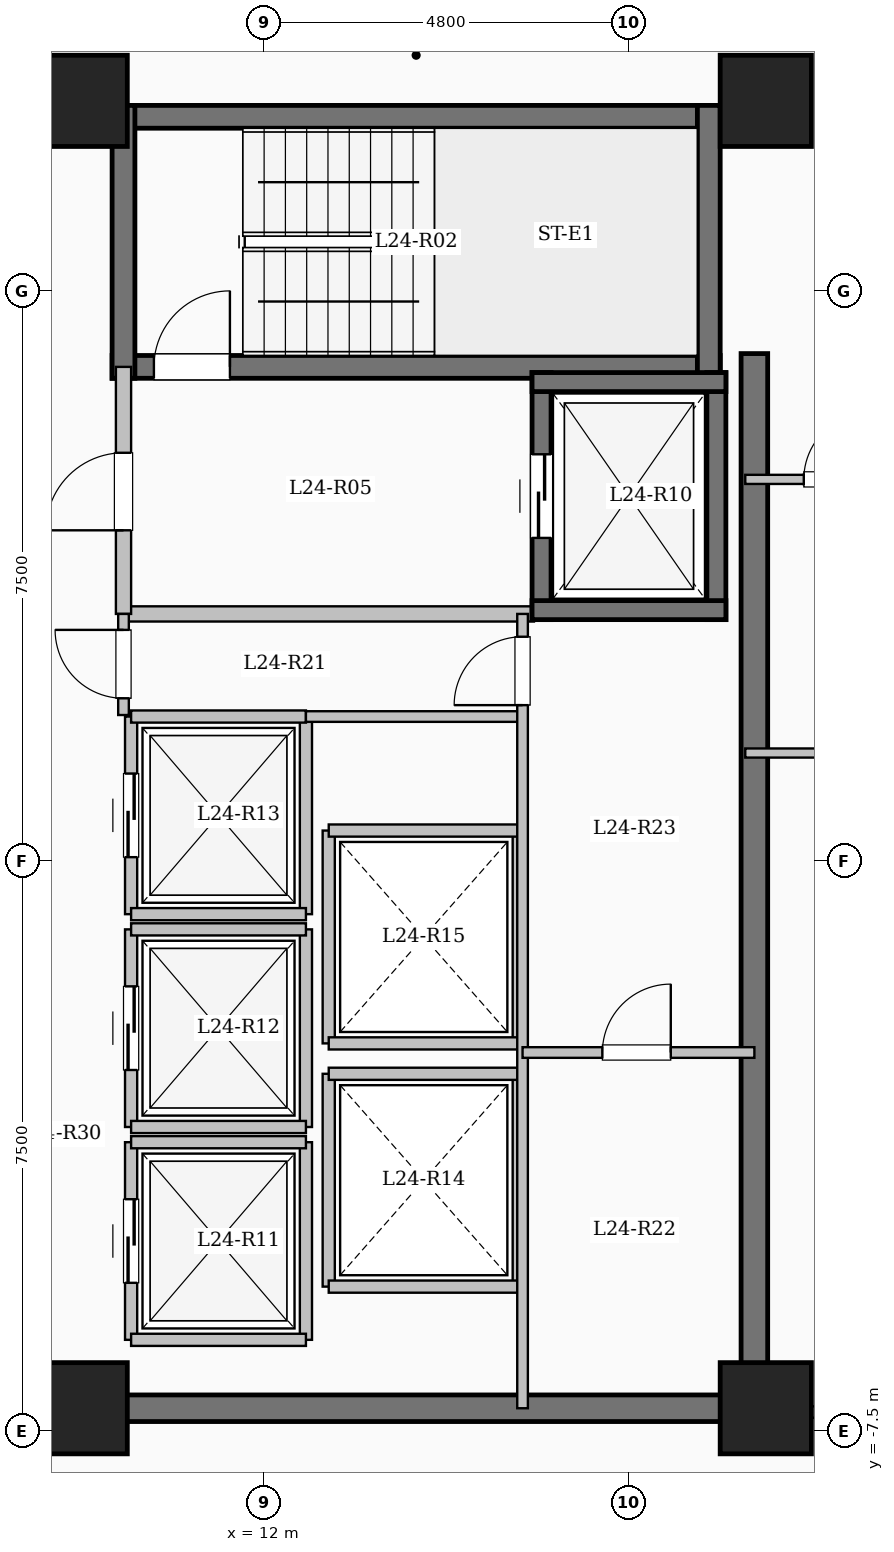
"""IFC4 building model, lengths in metres.
Left out: names, types, materials, properties, quantities, classifications, styles, units other than length and angle.
Written with IfcOpenShell. Run it as: python <this file> out.ifc"""

import sys

from ifc_helpers import new_model, si_unit, direction, frame, frame_2d, origin, origin_2d, place, context, subcontext, project, spatial, rectangle, extrude, element, fill, save


model = new_model("IFC4")
c1 = context("Model", 3, precision=1e-05, world=origin(), true_north=direction((0.0, 1.0)))
c2 = subcontext(c1, "Body", "Model", "MODEL_VIEW")
j1 = project(units=[si_unit("LENGTHUNIT", "METRE"), si_unit("PLANEANGLEUNIT", "RADIAN")], contexts=[c1])
p1 = place(None, origin())
s1 = spatial("IfcSite", under=j1, at=p1, CompositionType="ELEMENT")
p2 = place(p1, origin())
s2 = spatial("IfcBuilding", under=s1, at=p2, CompositionType="ELEMENT")
p3 = place(p2, frame((0.0, 0.0, 91.7)))
s3 = spatial("IfcBuildingStorey", under=s2, at=p3, CompositionType="ELEMENT", Elevation=91.7)
for number, where, z_axis, x_axis in (
    (1, (9.6, -7.2, 0.0), (0.0, 0.0, 1.0), (1.0, 0.0, 0.0)),
    (2, (9.6, 10.0, 0.0), (0.0, 0.0, 1.0), (1.0, 0.0, 0.0)),
    (3, (18.6, -7.2, 0.0), (0.0, 0.0, 1.0), (1.0, 0.0, 0.0)),
    (4, (18.6, 10.0, 0.0), (0.0, 0.0, 1.0), (1.0, 0.0, 0.0)),
):
    element("IfcColumn", number, at=place(p3, frame(where, z_axis=z_axis, x_axis=x_axis)), inside=s3, PredefinedType="COLUMN", context=c2, shape_type="SweptSolid", body=[
        extrude(rectangle(XDim=1.2, YDim=1.2, at=origin_2d()), origin(), (0.0, 0.0, 1.0), 3.35),
    ])
p4 = place(p3, frame((10.0, 9.79, 0.0), z_axis=(0.0, 0.0, 1.0), x_axis=(1.0, 0.0, 0.0)))
e5 = element("IfcWall", 5, at=p4, inside=s3, PredefinedType="SHEAR", context=c2, shape_type="SweptSolid", body=[
    extrude(rectangle(XDim=8.0, YDim=0.3, at=frame_2d((4.0, 0.0))), origin(), (0.0, 0.0, 1.0), 3.35),
])
p5 = place(p3, frame((10.0, 6.5, 0.0), z_axis=(0.0, 0.0, 1.0), x_axis=(1.0, 0.0, 0.0)))
e6 = element("IfcWall", 6, at=p5, inside=s3, PredefinedType="SHEAR", context=c2, shape_type="SweptSolid", body=[
    extrude(rectangle(XDim=8.0, YDim=0.3, at=frame_2d((4.0, 0.0))), origin(), (0.0, 0.0, 1.0), 3.35),
])
p6 = place(p5, frame((0.55, 0.0, 0.0)))
e7 = element("IfcOpeningElement", 7, at=p6, cuts=e6, PredefinedType="OPENING", context=c2, shape_type="SweptSolid", body=[
    extrude(rectangle(XDim=1.0, YDim=2.15, at=frame_2d((0.5, 1.075))), frame((0.0, 0.16, 0.0), z_axis=(0.0, -1.0, 0.0), x_axis=(1.0, 0.0, 0.0)), (0.0, 0.0, 1.0), 0.32),
])
for number, where, z_axis, x_axis in (
    (8, (10.15, 6.35, 0.0), (0.0, 0.0, 1.0), (0.0, 1.0, 0.0)),
    (9, (17.85, 6.35, 0.0), (0.0, 0.0, 1.0), (0.0, 1.0, 0.0)),
):
    element("IfcWall", number, at=place(p3, frame(where, z_axis=z_axis, x_axis=x_axis)), inside=s3, PredefinedType="SHEAR", context=c2, shape_type="SweptSolid", body=[
        extrude(rectangle(XDim=3.59, YDim=0.3, at=frame_2d((1.795, 0.0))), origin(), (0.0, 0.0, 1.0), 3.35),
    ])
p7 = place(p3, frame((10.15, 3.25, 0.0), z_axis=(0.0, 0.0, 1.0), x_axis=(1.0, 0.0, 0.0)))
e10 = element("IfcWall", 10, at=p7, inside=s3, PredefinedType="SOLIDWALL", context=c2, shape_type="SweptSolid", body=[
    extrude(rectangle(XDim=5.4, YDim=0.2, at=frame_2d((2.7, 0.0))), origin(), (0.0, 0.0, 1.0), 3.1),
])
p8 = place(p3, frame((10.15, 3.25, 0.0), z_axis=(0.0, 0.0, 1.0), x_axis=(0.0, 1.0, 0.0)))
e11 = element("IfcWall", 11, at=p8, inside=s3, PredefinedType="SOLIDWALL", context=c2, shape_type="SweptSolid", body=[
    extrude(rectangle(XDim=3.25, YDim=0.2, at=frame_2d((1.625, 0.0))), origin(), (0.0, 0.0, 1.0), 3.1),
])
p9 = place(p8, frame((1.1, 0.0, 0.0)))
e12 = element("IfcOpeningElement", 12, at=p9, cuts=e11, PredefinedType="OPENING", context=c2, shape_type="SweptSolid", body=[
    extrude(rectangle(XDim=1.02, YDim=2.15, at=frame_2d((0.51, 1.075))), frame((0.0, 0.11, 0.0), z_axis=(0.0, -1.0, 0.0), x_axis=(1.0, 0.0, 0.0)), (0.0, 0.0, 1.0), 0.22),
])
p10 = place(p3, frame((15.65, 3.175, 0.0), z_axis=(0.0, 0.0, 1.0), x_axis=(0.0, 1.0, 0.0)))
e13 = element("IfcWall", 13, at=p10, inside=s3, PredefinedType="SHEAR", context=c2, shape_type="SweptSolid", body=[
    extrude(rectangle(XDim=3.25, YDim=0.25, at=frame_2d((1.625, 0.0))), origin(), (0.0, 0.0, 1.0), 3.35),
])
p11 = place(p10, frame((1.075, 0.0, 0.0)))
e14 = element("IfcOpeningElement", 14, at=p11, cuts=e13, PredefinedType="OPENING", context=c2, shape_type="SweptSolid", body=[
    extrude(rectangle(XDim=1.1, YDim=2.15, at=frame_2d((0.55, 1.075))), frame((0.0, 0.135, 0.0), z_axis=(0.0, -1.0, 0.0), x_axis=(1.0, 0.0, 0.0)), (0.0, 0.0, 1.0), 0.27),
])
p12 = place(p3, frame((17.95, 3.175, 0.0), z_axis=(0.0, 0.0, 1.0), x_axis=(0.0, 1.0, 0.0)))
e15 = element("IfcWall", 15, at=p12, inside=s3, PredefinedType="SHEAR", context=c2, shape_type="SweptSolid", body=[
    extrude(rectangle(XDim=3.25, YDim=0.25, at=frame_2d((1.625, 0.0))), origin(), (0.0, 0.0, 1.0), 3.35),
])
for number, where, z_axis, x_axis in (
    (16, (15.525, 3.3, 0.0), (0.0, 0.0, 1.0), (1.0, 0.0, 0.0)),
    (17, (15.525, 6.3, 0.0), (0.0, 0.0, 1.0), (1.0, 0.0, 0.0)),
):
    element("IfcWall", number, at=place(p3, frame(where, z_axis=z_axis, x_axis=x_axis)), inside=s3, PredefinedType="SHEAR", context=c2, shape_type="SweptSolid", body=[
        extrude(rectangle(XDim=2.55, YDim=0.25, at=frame_2d((1.275, 0.0))), origin(), (0.0, 0.0, 1.0), 3.35),
    ])
p13 = place(p3, frame((10.25, -6.3, 0.0), z_axis=(0.0, 0.0, 1.0), x_axis=(0.0, 1.0, 0.0)))
e18 = element("IfcWall", 18, at=p13, inside=s3, PredefinedType="SOLIDWALL", context=c2, shape_type="SweptSolid", body=[
    extrude(rectangle(XDim=2.6, YDim=0.16, at=frame_2d((1.3, 0.0))), origin(), (0.0, 0.0, 1.0), 3.1),
])
p14 = place(p13, frame((0.75, 0.0, 0.0)))
e19 = element("IfcOpeningElement", 19, at=p14, cuts=e18, PredefinedType="OPENING", context=c2, shape_type="SweptSolid", body=[
    extrude(rectangle(XDim=1.1, YDim=2.15, at=frame_2d((0.55, 1.075))), frame((0.0, 0.09, 0.0), z_axis=(0.0, -1.0, 0.0), x_axis=(1.0, 0.0, 0.0)), (0.0, 0.0, 1.0), 0.18),
])
p15 = place(p3, frame((12.55, -6.3, 0.0), z_axis=(0.0, 0.0, 1.0), x_axis=(0.0, 1.0, 0.0)))
e20 = element("IfcWall", 20, at=p15, inside=s3, PredefinedType="SOLIDWALL", context=c2, shape_type="SweptSolid", body=[
    extrude(rectangle(XDim=2.6, YDim=0.16, at=frame_2d((1.3, 0.0))), origin(), (0.0, 0.0, 1.0), 3.1),
])
for number, where, z_axis, x_axis in (
    (21, (10.25, -6.3, 0.0), (0.0, 0.0, 1.0), (1.0, 0.0, 0.0)),
    (22, (10.25, -3.7, 0.0), (0.0, 0.0, 1.0), (1.0, 0.0, 0.0)),
):
    element("IfcWall", number, at=place(p3, frame(where, z_axis=z_axis, x_axis=x_axis)), inside=s3, PredefinedType="SOLIDWALL", context=c2, shape_type="SweptSolid", body=[
        extrude(rectangle(XDim=2.3, YDim=0.16, at=frame_2d((1.15, 0.0))), origin(), (0.0, 0.0, 1.0), 3.1),
    ])
p16 = place(p3, frame((10.25, -3.5, 0.0), z_axis=(0.0, 0.0, 1.0), x_axis=(0.0, 1.0, 0.0)))
e23 = element("IfcWall", 23, at=p16, inside=s3, PredefinedType="SOLIDWALL", context=c2, shape_type="SweptSolid", body=[
    extrude(rectangle(XDim=2.6, YDim=0.16, at=frame_2d((1.3, 0.0))), origin(), (0.0, 0.0, 1.0), 3.1),
])
p17 = place(p16, frame((0.75, 0.0, 0.0)))
e24 = element("IfcOpeningElement", 24, at=p17, cuts=e23, PredefinedType="OPENING", context=c2, shape_type="SweptSolid", body=[
    extrude(rectangle(XDim=1.1, YDim=2.15, at=frame_2d((0.55, 1.075))), frame((0.0, 0.09, 0.0), z_axis=(0.0, -1.0, 0.0), x_axis=(1.0, 0.0, 0.0)), (0.0, 0.0, 1.0), 0.18),
])
p18 = place(p3, frame((12.55, -3.5, 0.0), z_axis=(0.0, 0.0, 1.0), x_axis=(0.0, 1.0, 0.0)))
e25 = element("IfcWall", 25, at=p18, inside=s3, PredefinedType="SOLIDWALL", context=c2, shape_type="SweptSolid", body=[
    extrude(rectangle(XDim=2.6, YDim=0.16, at=frame_2d((1.3, 0.0))), origin(), (0.0, 0.0, 1.0), 3.1),
])
for number, where, z_axis, x_axis in (
    (26, (10.25, -3.5, 0.0), (0.0, 0.0, 1.0), (1.0, 0.0, 0.0)),
    (27, (10.25, -0.9, 0.0), (0.0, 0.0, 1.0), (1.0, 0.0, 0.0)),
):
    element("IfcWall", number, at=place(p3, frame(where, z_axis=z_axis, x_axis=x_axis)), inside=s3, PredefinedType="SOLIDWALL", context=c2, shape_type="SweptSolid", body=[
        extrude(rectangle(XDim=2.3, YDim=0.16, at=frame_2d((1.15, 0.0))), origin(), (0.0, 0.0, 1.0), 3.1),
    ])
p19 = place(p3, frame((10.25, -0.7, 0.0), z_axis=(0.0, 0.0, 1.0), x_axis=(0.0, 1.0, 0.0)))
e28 = element("IfcWall", 28, at=p19, inside=s3, PredefinedType="SOLIDWALL", context=c2, shape_type="SweptSolid", body=[
    extrude(rectangle(XDim=2.6, YDim=0.16, at=frame_2d((1.3, 0.0))), origin(), (0.0, 0.0, 1.0), 3.1),
])
p20 = place(p19, frame((0.75, 0.0, 0.0)))
e29 = element("IfcOpeningElement", 29, at=p20, cuts=e28, PredefinedType="OPENING", context=c2, shape_type="SweptSolid", body=[
    extrude(rectangle(XDim=1.1, YDim=2.15, at=frame_2d((0.55, 1.075))), frame((0.0, 0.09, 0.0), z_axis=(0.0, -1.0, 0.0), x_axis=(1.0, 0.0, 0.0)), (0.0, 0.0, 1.0), 0.18),
])
p21 = place(p3, frame((12.55, -0.7, 0.0), z_axis=(0.0, 0.0, 1.0), x_axis=(0.0, 1.0, 0.0)))
e30 = element("IfcWall", 30, at=p21, inside=s3, PredefinedType="SOLIDWALL", context=c2, shape_type="SweptSolid", body=[
    extrude(rectangle(XDim=2.6, YDim=0.16, at=frame_2d((1.3, 0.0))), origin(), (0.0, 0.0, 1.0), 3.1),
])
for number, where, z_axis, x_axis in (
    (31, (10.25, -0.7, 0.0), (0.0, 0.0, 1.0), (1.0, 0.0, 0.0)),
    (32, (10.25, 1.9, 0.0), (0.0, 0.0, 1.0), (1.0, 0.0, 0.0)),
):
    element("IfcWall", number, at=place(p3, frame(where, z_axis=z_axis, x_axis=x_axis)), inside=s3, PredefinedType="SOLIDWALL", context=c2, shape_type="SweptSolid", body=[
        extrude(rectangle(XDim=2.3, YDim=0.16, at=frame_2d((1.15, 0.0))), origin(), (0.0, 0.0, 1.0), 3.1),
    ])
for number, where, z_axis, x_axis in (
    (33, (12.85, -5.6, 0.0), (0.0, 0.0, 1.0), (0.0, 1.0, 0.0)),
    (34, (15.35, -5.6, 0.0), (0.0, 0.0, 1.0), (0.0, 1.0, 0.0)),
):
    element("IfcWall", number, at=place(p3, frame(where, z_axis=z_axis, x_axis=x_axis)), inside=s3, PredefinedType="SOLIDWALL", context=c2, shape_type="SweptSolid", body=[
        extrude(rectangle(XDim=2.8, YDim=0.16, at=frame_2d((1.4, 0.0))), origin(), (0.0, 0.0, 1.0), 3.1),
    ])
for number, where, z_axis, x_axis in (
    (35, (12.85, -5.6, 0.0), (0.0, 0.0, 1.0), (1.0, 0.0, 0.0)),
    (36, (12.85, -2.8, 0.0), (0.0, 0.0, 1.0), (1.0, 0.0, 0.0)),
):
    element("IfcWall", number, at=place(p3, frame(where, z_axis=z_axis, x_axis=x_axis)), inside=s3, PredefinedType="SOLIDWALL", context=c2, shape_type="SweptSolid", body=[
        extrude(rectangle(XDim=2.5, YDim=0.16, at=frame_2d((1.25, 0.0))), origin(), (0.0, 0.0, 1.0), 3.1),
    ])
for number, where, z_axis, x_axis in (
    (37, (12.85, -2.4, 0.0), (0.0, 0.0, 1.0), (0.0, 1.0, 0.0)),
    (38, (15.35, -2.4, 0.0), (0.0, 0.0, 1.0), (0.0, 1.0, 0.0)),
):
    element("IfcWall", number, at=place(p3, frame(where, z_axis=z_axis, x_axis=x_axis)), inside=s3, PredefinedType="SOLIDWALL", context=c2, shape_type="SweptSolid", body=[
        extrude(rectangle(XDim=2.8, YDim=0.16, at=frame_2d((1.4, 0.0))), origin(), (0.0, 0.0, 1.0), 3.1),
    ])
for number, where, z_axis, x_axis in (
    (39, (12.85, -2.4, 0.0), (0.0, 0.0, 1.0), (1.0, 0.0, 0.0)),
    (40, (12.85, 0.4, 0.0), (0.0, 0.0, 1.0), (1.0, 0.0, 0.0)),
):
    element("IfcWall", number, at=place(p3, frame(where, z_axis=z_axis, x_axis=x_axis)), inside=s3, PredefinedType="SOLIDWALL", context=c2, shape_type="SweptSolid", body=[
        extrude(rectangle(XDim=2.5, YDim=0.16, at=frame_2d((1.25, 0.0))), origin(), (0.0, 0.0, 1.0), 3.1),
    ])
p22 = place(p3, frame((18.45, -7.375, 0.0), z_axis=(0.0, 0.0, 1.0), x_axis=(0.0, 1.0, 0.0)))
e41 = element("IfcWall", 41, at=p22, inside=s3, PredefinedType="SHEAR", context=c2, shape_type="SweptSolid", body=[
    extrude(rectangle(XDim=14.05, YDim=0.35, at=frame_2d((7.025, 0.0))), origin(), (0.0, 0.0, 1.0), 3.35),
])
p23 = place(p3, frame((10.075, -7.2, 0.0), z_axis=(0.0, 0.0, 1.0), x_axis=(1.0, 0.0, 0.0)))
e42 = element("IfcWall", 42, at=p23, inside=s3, PredefinedType="SHEAR", context=c2, shape_type="SweptSolid", body=[
    extrude(rectangle(XDim=8.55, YDim=0.35, at=frame_2d((4.275, 0.0))), origin(), (0.0, 0.0, 1.0), 3.35),
])
p24 = place(p3, frame((12.55, 1.9, 0.0), z_axis=(0.0, 0.0, 1.0), x_axis=(1.0, 0.0, 0.0)))
e43 = element("IfcWall", 43, at=p24, inside=s3, PredefinedType="PARTITIONING", context=c2, shape_type="SweptSolid", body=[
    extrude(rectangle(XDim=2.85, YDim=0.14, at=frame_2d((1.425, 0.0))), origin(), (0.0, 0.0, 1.0), 3.1),
])
p25 = place(p3, frame((10.15, 1.92, 0.0), z_axis=(0.0, 0.0, 1.0), x_axis=(0.0, 1.0, 0.0)))
e44 = element("IfcWall", 44, at=p25, inside=s3, PredefinedType="PARTITIONING", context=c2, shape_type="SweptSolid", body=[
    extrude(rectangle(XDim=1.33, YDim=0.14, at=frame_2d((0.665, 0.0))), origin(), (0.0, 0.0, 1.0), 3.1),
])
p26 = place(p25, frame((0.22, 0.0, 0.0)))
e45 = element("IfcOpeningElement", 45, at=p26, cuts=e44, PredefinedType="OPENING", context=c2, shape_type="SweptSolid", body=[
    extrude(rectangle(XDim=0.9, YDim=2.08, at=frame_2d((0.45, 1.04))), frame((0.0, 0.08, 0.0), z_axis=(0.0, -1.0, 0.0), x_axis=(1.0, 0.0, 0.0)), (0.0, 0.0, 1.0), 0.16),
])
p27 = place(p3, frame((15.4, -7.2, 0.0), z_axis=(0.0, 0.0, 1.0), x_axis=(0.0, 1.0, 0.0)))
e46 = element("IfcWall", 46, at=p27, inside=s3, PredefinedType="PARTITIONING", context=c2, shape_type="SweptSolid", body=[
    extrude(rectangle(XDim=10.45, YDim=0.14, at=frame_2d((5.225, 0.0))), origin(), (0.0, 0.0, 1.0), 3.1),
])
p28 = place(p27, frame((9.25, 0.0, 0.0)))
e47 = element("IfcOpeningElement", 47, at=p28, cuts=e46, PredefinedType="OPENING", context=c2, shape_type="SweptSolid", body=[
    extrude(rectangle(XDim=0.9, YDim=2.08, at=frame_2d((0.45, 1.04))), frame((0.0, 0.08, 0.0), z_axis=(0.0, -1.0, 0.0), x_axis=(1.0, 0.0, 0.0)), (0.0, 0.0, 1.0), 0.16),
])
p29 = place(p3, frame((15.4, -2.52, 0.0), z_axis=(0.0, 0.0, 1.0), x_axis=(1.0, 0.0, 0.0)))
e48 = element("IfcWall", 48, at=p29, inside=s3, PredefinedType="PARTITIONING", context=c2, shape_type="SweptSolid", body=[
    extrude(rectangle(XDim=3.05, YDim=0.14, at=frame_2d((1.525, 0.0))), origin(), (0.0, 0.0, 1.0), 3.1),
])
p30 = place(p29, frame((1.05, 0.0, 0.0)))
e49 = element("IfcOpeningElement", 49, at=p30, cuts=e48, PredefinedType="OPENING", context=c2, shape_type="SweptSolid", body=[
    extrude(rectangle(XDim=0.9, YDim=2.08, at=frame_2d((0.45, 1.04))), frame((0.0, 0.08, 0.0), z_axis=(0.0, -1.0, 0.0), x_axis=(1.0, 0.0, 0.0)), (0.0, 0.0, 1.0), 0.16),
])
p31 = place(p3, frame((18.45, -7.25, 0.0), z_axis=(0.0, 0.0, 1.0), x_axis=(1.0, 0.0, 0.0)))
e50 = element("IfcWall", 50, at=p31, inside=s3, PredefinedType="PARTITIONING", context=c2, shape_type="SweptSolid", body=[
    extrude(rectangle(XDim=8.43, YDim=0.15, at=frame_2d((4.215, 0.0))), origin(), (0.0, 0.0, 1.0), 3.1),
])
p32 = place(p31, frame((1.95, 0.0, 0.0)))
e51 = element("IfcOpeningElement", 51, at=p32, cuts=e50, PredefinedType="OPENING", context=c2, shape_type="SweptSolid", body=[
    extrude(rectangle(XDim=0.96, YDim=2.15, at=frame_2d((0.48, 1.075))), frame((0.0, 0.085, 0.0), z_axis=(0.0, -1.0, 0.0), x_axis=(1.0, 0.0, 0.0)), (0.0, 0.0, 1.0), 0.17),
])
p33 = place(p3, frame((18.33, 1.42, 0.0), z_axis=(0.0, 0.0, 1.0), x_axis=(1.0, 0.0, 0.0)))
e52 = element("IfcWall", 52, at=p33, inside=s3, PredefinedType="PARTITIONING", context=c2, shape_type="SweptSolid", body=[
    extrude(rectangle(XDim=8.67, YDim=0.12, at=frame_2d((4.335, 0.0))), origin(), (0.0, 0.0, 1.0), 3.1),
])
p34 = place(p33, frame((1.863, 0.0, 0.0)))
e53 = element("IfcOpeningElement", 53, at=p34, cuts=e52, PredefinedType="OPENING", context=c2, shape_type="SweptSolid", body=[
    extrude(rectangle(XDim=0.88, YDim=2.1, at=frame_2d((0.44, 1.05))), frame((0.0, 0.07, 0.0), z_axis=(0.0, -1.0, 0.0), x_axis=(1.0, 0.0, 0.0)), (0.0, 0.0, 1.0), 0.14),
])
p35 = place(p33, frame((6.028, 0.0, 0.0)))
e54 = element("IfcOpeningElement", 54, at=p35, cuts=e52, PredefinedType="OPENING", context=c2, shape_type="SweptSolid", body=[
    extrude(rectangle(XDim=0.88, YDim=2.1, at=frame_2d((0.44, 1.05))), frame((0.0, 0.07, 0.0), z_axis=(0.0, -1.0, 0.0), x_axis=(1.0, 0.0, 0.0)), (0.0, 0.0, 1.0), 0.14),
])
p36 = place(p3, frame((18.33, 5.02, 0.0), z_axis=(0.0, 0.0, 1.0), x_axis=(1.0, 0.0, 0.0)))
e55 = element("IfcWall", 55, at=p36, inside=s3, PredefinedType="PARTITIONING", context=c2, shape_type="SweptSolid", body=[
    extrude(rectangle(XDim=8.67, YDim=0.12, at=frame_2d((4.335, 0.0))), origin(), (0.0, 0.0, 1.0), 3.1),
])
p37 = place(p36, frame((0.77, 0.0, 0.0)))
e56 = element("IfcOpeningElement", 56, at=p37, cuts=e55, PredefinedType="OPENING", context=c2, shape_type="SweptSolid", body=[
    extrude(rectangle(XDim=0.88, YDim=2.1, at=frame_2d((0.44, 1.05))), frame((0.0, 0.07, 0.0), z_axis=(0.0, -1.0, 0.0), x_axis=(1.0, 0.0, 0.0)), (0.0, 0.0, 1.0), 0.14),
])
p38 = place(p6, origin())
e57 = element("IfcDoor", 57, at=p38, inside=s3, OperationType="SINGLE_SWING_RIGHT", PredefinedType="DOOR", context=c2, shape_type="SweptSolid", body=[
    extrude(rectangle(XDim=1.0, YDim=2.15, at=frame_2d((0.5, 1.075))), frame((0.0, 0.025, 0.0), z_axis=(0.0, -1.0, 0.0), x_axis=(1.0, 0.0, 0.0)), (0.0, 0.0, 1.0), 0.05),
])
fill(e7, e57)
p39 = place(p9, origin())
e58 = element("IfcDoor", 58, at=p39, inside=s3, OperationType="SINGLE_SWING_LEFT", PredefinedType="DOOR", context=c2, shape_type="SweptSolid", body=[
    extrude(rectangle(XDim=1.02, YDim=2.15, at=frame_2d((0.51, 1.075))), frame((0.0, 0.025, 0.0), z_axis=(0.0, -1.0, 0.0), x_axis=(1.0, 0.0, 0.0)), (0.0, 0.0, 1.0), 0.05),
])
fill(e12, e58)
p40 = place(p11, origin())
e59 = element("IfcDoor", 59, at=p40, inside=s3, OperationType="SLIDING_TO_LEFT", PredefinedType="DOOR", context=c2, shape_type="SweptSolid", body=[
    extrude(rectangle(XDim=1.1, YDim=2.15, at=frame_2d((0.55, 1.075))), frame((0.0, 0.025, 0.0), z_axis=(0.0, -1.0, 0.0), x_axis=(1.0, 0.0, 0.0)), (0.0, 0.0, 1.0), 0.05),
])
fill(e14, e59)
p41 = place(p14, origin())
e60 = element("IfcDoor", 60, at=p41, inside=s3, OperationType="SLIDING_TO_LEFT", PredefinedType="DOOR", context=c2, shape_type="SweptSolid", body=[
    extrude(rectangle(XDim=1.1, YDim=2.15, at=frame_2d((0.55, 1.075))), frame((0.0, 0.025, 0.0), z_axis=(0.0, -1.0, 0.0), x_axis=(1.0, 0.0, 0.0)), (0.0, 0.0, 1.0), 0.05),
])
fill(e19, e60)
p42 = place(p17, origin())
e61 = element("IfcDoor", 61, at=p42, inside=s3, OperationType="SLIDING_TO_LEFT", PredefinedType="DOOR", context=c2, shape_type="SweptSolid", body=[
    extrude(rectangle(XDim=1.1, YDim=2.15, at=frame_2d((0.55, 1.075))), frame((0.0, 0.025, 0.0), z_axis=(0.0, -1.0, 0.0), x_axis=(1.0, 0.0, 0.0)), (0.0, 0.0, 1.0), 0.05),
])
fill(e24, e61)
p43 = place(p20, origin())
e62 = element("IfcDoor", 62, at=p43, inside=s3, OperationType="SLIDING_TO_LEFT", PredefinedType="DOOR", context=c2, shape_type="SweptSolid", body=[
    extrude(rectangle(XDim=1.1, YDim=2.15, at=frame_2d((0.55, 1.075))), frame((0.0, 0.025, 0.0), z_axis=(0.0, -1.0, 0.0), x_axis=(1.0, 0.0, 0.0)), (0.0, 0.0, 1.0), 0.05),
])
fill(e29, e62)
p44 = place(p26, origin())
e63 = element("IfcDoor", 63, at=p44, inside=s3, OperationType="SINGLE_SWING_RIGHT", PredefinedType="DOOR", context=c2, shape_type="SweptSolid", body=[
    extrude(rectangle(XDim=0.9, YDim=2.08, at=frame_2d((0.45, 1.04))), frame((0.0, 0.025, 0.0), z_axis=(0.0, -1.0, 0.0), x_axis=(1.0, 0.0, 0.0)), (0.0, 0.0, 1.0), 0.05),
])
fill(e45, e63)
p45 = place(p28, origin())
e64 = element("IfcDoor", 64, at=p45, inside=s3, OperationType="SINGLE_SWING_LEFT", PredefinedType="DOOR", context=c2, shape_type="SweptSolid", body=[
    extrude(rectangle(XDim=0.9, YDim=2.08, at=frame_2d((0.45, 1.04))), frame((0.0, 0.025, 0.0), z_axis=(0.0, -1.0, 0.0), x_axis=(1.0, 0.0, 0.0)), (0.0, 0.0, 1.0), 0.05),
])
fill(e47, e64)
p46 = place(p30, origin())
e65 = element("IfcDoor", 65, at=p46, inside=s3, OperationType="SINGLE_SWING_RIGHT", PredefinedType="DOOR", context=c2, shape_type="SweptSolid", body=[
    extrude(rectangle(XDim=0.9, YDim=2.08, at=frame_2d((0.45, 1.04))), frame((0.0, 0.025, 0.0), z_axis=(0.0, -1.0, 0.0), x_axis=(1.0, 0.0, 0.0)), (0.0, 0.0, 1.0), 0.05),
])
fill(e49, e65)
p47 = place(p37, origin())
e66 = element("IfcDoor", 66, at=p47, inside=s3, OperationType="SINGLE_SWING_RIGHT", PredefinedType="DOOR", context=c2, shape_type="SweptSolid", body=[
    extrude(rectangle(XDim=0.88, YDim=2.1, at=frame_2d((0.44, 1.05))), frame((0.0, 0.025, 0.0), z_axis=(0.0, -1.0, 0.0), x_axis=(1.0, 0.0, 0.0)), (0.0, 0.0, 1.0), 0.05),
])
fill(e56, e66)
save(model, sys.argv[1])
